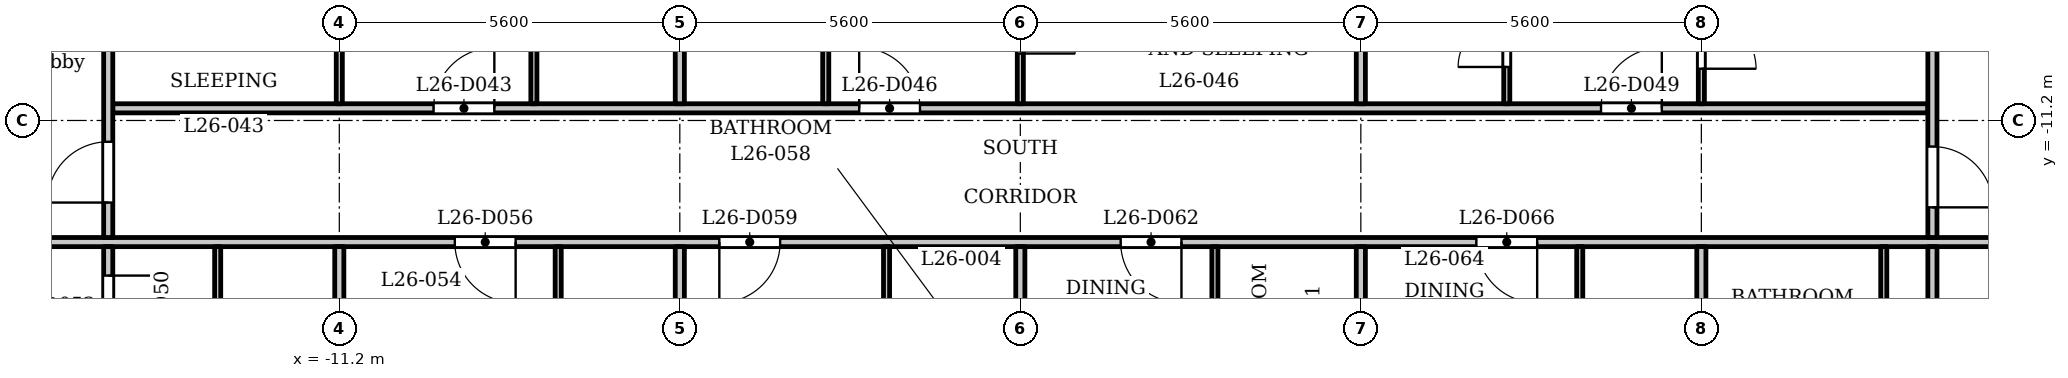
"""IFC4 building model, lengths in metres.
Left out: names, types, materials, properties, quantities, classifications, styles, units other than length and angle.
Written with IfcOpenShell. Run it as: python <this file> out.ifc"""

import sys

from ifc_helpers import new_model, si_unit, direction, frame, frame_2d, origin, place, context, subcontext, project, spatial, rectangle, extrude, element, fill, save


model = new_model("IFC4")
c1 = context("Model", 3, precision=1e-05, world=origin(), true_north=direction((0.0, 1.0)))
c2 = subcontext(c1, "Body", "Model", "MODEL_VIEW")
j1 = project(units=[si_unit("LENGTHUNIT", "METRE"), si_unit("PLANEANGLEUNIT", "RADIAN")], contexts=[c1])
p1 = place(None, origin())
s1 = spatial("IfcSite", under=j1, at=p1, CompositionType="ELEMENT")
p2 = place(p1, origin())
s2 = spatial("IfcBuilding", under=s1, at=p2, CompositionType="ELEMENT")
p3 = place(p2, frame((0.0, 0.0, 104.3)))
s3 = spatial("IfcBuildingStorey", under=s2, at=p3, CompositionType="ELEMENT", Elevation=104.3)
p4 = place(p3, frame((-17.4, -13.2, 0.0), z_axis=(0.0, 0.0, 1.0), x_axis=(1.0, 0.0, 0.0)))
e1 = element("IfcWall", 1, at=p4, inside=s3, PredefinedType="PARTITIONING", context=c2, shape_type="SweptSolid", body=[
    extrude(rectangle(XDim=34.8, YDim=0.15, at=frame_2d((17.4, 0.0))), origin(), (0.0, 0.0, 1.0), 3.2),
])
p5 = place(p4, frame((0.15, 0.0, 0.0)))
e2 = element("IfcOpeningElement", 2, at=p5, cuts=e1, PredefinedType="OPENING", context=c2, shape_type="SweptSolid", body=[
    extrude(rectangle(XDim=1.0, YDim=2.1, at=frame_2d((0.5, 1.05))), frame((0.0, 0.085, 0.0), z_axis=(0.0, -1.0, 0.0), x_axis=(1.0, 0.0, 0.0)), (0.0, 0.0, 1.0), 0.17),
])
p6 = place(p4, frame((33.55, 0.0, 0.0)))
e3 = element("IfcOpeningElement", 3, at=p6, cuts=e1, PredefinedType="OPENING", context=c2, shape_type="SweptSolid", body=[
    extrude(rectangle(XDim=1.0, YDim=2.1, at=frame_2d((0.5, 1.05))), frame((0.0, 0.085, 0.0), z_axis=(0.0, -1.0, 0.0), x_axis=(1.0, 0.0, 0.0)), (0.0, 0.0, 1.0), 0.17),
])
p7 = place(p4, frame((8.1, 0.0, 0.0)))
e4 = element("IfcOpeningElement", 4, at=p7, cuts=e1, PredefinedType="OPENING", context=c2, shape_type="SweptSolid", body=[
    extrude(rectangle(XDim=1.0, YDim=2.1, at=frame_2d((0.5, 1.05))), frame((0.0, 0.085, 0.0), z_axis=(0.0, -1.0, 0.0), x_axis=(1.0, 0.0, 0.0)), (0.0, 0.0, 1.0), 0.17),
])
p8 = place(p4, frame((12.45, 0.0, 0.0)))
e5 = element("IfcOpeningElement", 5, at=p8, cuts=e1, PredefinedType="OPENING", context=c2, shape_type="SweptSolid", body=[
    extrude(rectangle(XDim=1.0, YDim=2.1, at=frame_2d((0.5, 1.05))), frame((0.0, 0.085, 0.0), z_axis=(0.0, -1.0, 0.0), x_axis=(1.0, 0.0, 0.0)), (0.0, 0.0, 1.0), 0.17),
])
p9 = place(p4, frame((19.05, 0.0, 0.0)))
e6 = element("IfcOpeningElement", 6, at=p9, cuts=e1, PredefinedType="OPENING", context=c2, shape_type="SweptSolid", body=[
    extrude(rectangle(XDim=1.0, YDim=2.1, at=frame_2d((0.5, 1.05))), frame((0.0, 0.085, 0.0), z_axis=(0.0, -1.0, 0.0), x_axis=(1.0, 0.0, 0.0)), (0.0, 0.0, 1.0), 0.17),
])
p10 = place(p4, frame((24.9, 0.0, 0.0)))
e7 = element("IfcOpeningElement", 7, at=p10, cuts=e1, PredefinedType="OPENING", context=c2, shape_type="SweptSolid", body=[
    extrude(rectangle(XDim=1.0, YDim=2.1, at=frame_2d((0.5, 1.05))), frame((0.0, 0.085, 0.0), z_axis=(0.0, -1.0, 0.0), x_axis=(1.0, 0.0, 0.0)), (0.0, 0.0, 1.0), 0.17),
])
p11 = place(p3, frame((-14.925, -11.0, 0.0), z_axis=(0.0, 0.0, 1.0), x_axis=(1.0, 0.0, 0.0)))
e8 = element("IfcWall", 8, at=p11, inside=s3, PredefinedType="PARTITIONING", context=c2, shape_type="SweptSolid", body=[
    extrude(rectangle(XDim=29.85, YDim=0.15, at=frame_2d((14.925, 0.0))), origin(), (0.0, 0.0, 1.0), 3.2),
])
p12 = place(p11, frame((5.275, 0.0, 0.0)))
e9 = element("IfcOpeningElement", 9, at=p12, cuts=e8, PredefinedType="OPENING", context=c2, shape_type="SweptSolid", body=[
    extrude(rectangle(XDim=1.0, YDim=2.1, at=frame_2d((0.5, 1.05))), frame((0.0, 0.085, 0.0), z_axis=(0.0, -1.0, 0.0), x_axis=(1.0, 0.0, 0.0)), (0.0, 0.0, 1.0), 0.17),
])
p13 = place(p11, frame((12.275, 0.0, 0.0)))
e10 = element("IfcOpeningElement", 10, at=p13, cuts=e8, PredefinedType="OPENING", context=c2, shape_type="SweptSolid", body=[
    extrude(rectangle(XDim=1.0, YDim=2.1, at=frame_2d((0.5, 1.05))), frame((0.0, 0.085, 0.0), z_axis=(0.0, -1.0, 0.0), x_axis=(1.0, 0.0, 0.0)), (0.0, 0.0, 1.0), 0.17),
])
p14 = place(p11, frame((24.475, 0.0, 0.0)))
e11 = element("IfcOpeningElement", 11, at=p14, cuts=e8, PredefinedType="OPENING", context=c2, shape_type="SweptSolid", body=[
    extrude(rectangle(XDim=1.0, YDim=2.1, at=frame_2d((0.5, 1.05))), frame((0.0, 0.085, 0.0), z_axis=(0.0, -1.0, 0.0), x_axis=(1.0, 0.0, 0.0)), (0.0, 0.0, 1.0), 0.17),
])
p15 = place(p3, frame((-15.0, -15.325, 0.0), z_axis=(0.0, 0.0, 1.0), x_axis=(0.0, 1.0, 0.0)))
e12 = element("IfcWall", 12, at=p15, inside=s3, PredefinedType="PARTITIONING", context=c2, shape_type="SweptSolid", body=[
    extrude(rectangle(XDim=2.05, YDim=0.15, at=frame_2d((1.025, 0.0))), origin(), (0.0, 0.0, 1.0), 3.2),
])
p16 = place(p15, frame((0.574, 0.0, 0.0)))
e13 = element("IfcOpeningElement", 13, at=p16, cuts=e12, PredefinedType="OPENING", context=c2, shape_type="SweptSolid", body=[
    extrude(rectangle(XDim=1.0, YDim=2.1, at=frame_2d((0.5, 1.05))), frame((0.0, 0.085, 0.0), z_axis=(0.0, -1.0, 0.0), x_axis=(1.0, 0.0, 0.0)), (0.0, 0.0, 1.0), 0.17),
])
p17 = place(p3, frame((-15.0, -13.125, 0.0), z_axis=(0.0, 0.0, 1.0), x_axis=(0.0, 1.0, 0.0)))
e14 = element("IfcWall", 14, at=p17, inside=s3, PredefinedType="PARTITIONING", context=c2, shape_type="SweptSolid", body=[
    extrude(rectangle(XDim=6.356, YDim=0.15, at=frame_2d((3.178, 0.0))), origin(), (0.0, 0.0, 1.0), 3.2),
])
p18 = place(p17, frame((0.575, 0.0, 0.0)))
e15 = element("IfcOpeningElement", 15, at=p18, cuts=e14, PredefinedType="OPENING", context=c2, shape_type="SweptSolid", body=[
    extrude(rectangle(XDim=1.0, YDim=2.1, at=frame_2d((0.5, 1.05))), frame((0.0, 0.085, 0.0), z_axis=(0.0, -1.0, 0.0), x_axis=(1.0, 0.0, 0.0)), (0.0, 0.0, 1.0), 0.17),
])
p19 = place(p3, frame((-13.2, -16.45, 0.0), z_axis=(0.0, 0.0, 1.0), x_axis=(0.0, 1.0, 0.0)))
e16 = element("IfcWall", 16, at=p19, inside=s3, PredefinedType="PARTITIONING", context=c2, shape_type="SweptSolid", body=[
    extrude(rectangle(XDim=3.175, YDim=0.1, at=frame_2d((1.587, 0.0))), origin(), (0.0, 0.0, 1.0), 3.2),
])
p20 = place(p3, frame((-11.2, -10.925, 0.0), z_axis=(0.0, 0.0, 1.0), x_axis=(0.0, 1.0, 0.0)))
e17 = element("IfcWall", 17, at=p20, inside=s3, PredefinedType="PARTITIONING", context=c2, shape_type="SweptSolid", body=[
    extrude(rectangle(XDim=3.605, YDim=0.1, at=frame_2d((1.802, 0.0))), origin(), (0.0, 0.0, 1.0), 3.2),
])
p21 = place(p20, frame((1.005, 0.0, 0.0)))
e18 = element("IfcOpeningElement", 18, at=p21, cuts=e17, PredefinedType="OPENING", context=c2, shape_type="SweptSolid", body=[
    extrude(rectangle(XDim=0.9, YDim=2.1, at=frame_2d((0.45, 1.05))), frame((0.0, 0.06, 0.0), z_axis=(0.0, -1.0, 0.0), x_axis=(1.0, 0.0, 0.0)), (0.0, 0.0, 1.0), 0.12),
])
p22 = place(p3, frame((-11.2, -16.45, 0.0), z_axis=(0.0, 0.0, 1.0), x_axis=(0.0, 1.0, 0.0)))
e19 = element("IfcWall", 19, at=p22, inside=s3, PredefinedType="PARTITIONING", context=c2, shape_type="SweptSolid", body=[
    extrude(rectangle(XDim=3.175, YDim=0.15, at=frame_2d((1.587, 0.0))), origin(), (0.0, 0.0, 1.0), 3.2),
])
p23 = place(p3, frame((-8.0, -10.925, 0.0), z_axis=(0.0, 0.0, 1.0), x_axis=(0.0, 1.0, 0.0)))
e20 = element("IfcWall", 20, at=p23, inside=s3, PredefinedType="PARTITIONING", context=c2, shape_type="SweptSolid", body=[
    extrude(rectangle(XDim=3.605, YDim=0.1, at=frame_2d((1.802, 0.0))), origin(), (0.0, 0.0, 1.0), 3.2),
])
p24 = place(p23, frame((2.326, 0.0, 0.0)))
e21 = element("IfcOpeningElement", 21, at=p24, cuts=e20, PredefinedType="OPENING", context=c2, shape_type="SweptSolid", body=[
    extrude(rectangle(XDim=0.8, YDim=2.1, at=frame_2d((0.4, 1.05))), frame((0.0, 0.06, 0.0), z_axis=(0.0, -1.0, 0.0), x_axis=(1.0, 0.0, 0.0)), (0.0, 0.0, 1.0), 0.12),
])
p25 = place(p3, frame((-7.6, -16.45, 0.0), z_axis=(0.0, 0.0, 1.0), x_axis=(0.0, 1.0, 0.0)))
e22 = element("IfcWall", 22, at=p25, inside=s3, PredefinedType="PARTITIONING", context=c2, shape_type="SweptSolid", body=[
    extrude(rectangle(XDim=3.175, YDim=0.1, at=frame_2d((1.587, 0.0))), origin(), (0.0, 0.0, 1.0), 3.2),
])
p26 = place(p3, frame((-5.6, -16.45, 0.0), z_axis=(0.0, 0.0, 1.0), x_axis=(0.0, 1.0, 0.0)))
e23 = element("IfcWall", 23, at=p26, inside=s3, PredefinedType="PARTITIONING", context=c2, shape_type="SweptSolid", body=[
    extrude(rectangle(XDim=3.175, YDim=0.15, at=frame_2d((1.587, 0.0))), origin(), (0.0, 0.0, 1.0), 3.2),
])
p27 = place(p3, frame((-5.6, -10.925, 0.0), z_axis=(0.0, 0.0, 1.0), x_axis=(0.0, 1.0, 0.0)))
e24 = element("IfcWall", 24, at=p27, inside=s3, PredefinedType="PARTITIONING", context=c2, shape_type="SweptSolid", body=[
    extrude(rectangle(XDim=3.605, YDim=0.15, at=frame_2d((1.802, 0.0))), origin(), (0.0, 0.0, 1.0), 3.2),
])
p28 = place(p3, frame((-3.2, -10.925, 0.0), z_axis=(0.0, 0.0, 1.0), x_axis=(0.0, 1.0, 0.0)))
e25 = element("IfcWall", 25, at=p28, inside=s3, PredefinedType="PARTITIONING", context=c2, shape_type="SweptSolid", body=[
    extrude(rectangle(XDim=3.605, YDim=0.1, at=frame_2d((1.802, 0.0))), origin(), (0.0, 0.0, 1.0), 3.2),
])
p29 = place(p28, frame((2.355, 0.0, 0.0)))
e26 = element("IfcOpeningElement", 26, at=p29, cuts=e25, PredefinedType="OPENING", context=c2, shape_type="SweptSolid", body=[
    extrude(rectangle(XDim=0.8, YDim=2.1, at=frame_2d((0.4, 1.05))), frame((0.0, 0.06, 0.0), z_axis=(0.0, -1.0, 0.0), x_axis=(1.0, 0.0, 0.0)), (0.0, 0.0, 1.0), 0.12),
])
p30 = place(p3, frame((-2.2, -16.45, 0.0), z_axis=(0.0, 0.0, 1.0), x_axis=(0.0, 1.0, 0.0)))
e27 = element("IfcWall", 27, at=p30, inside=s3, PredefinedType="PARTITIONING", context=c2, shape_type="SweptSolid", body=[
    extrude(rectangle(XDim=3.175, YDim=0.1, at=frame_2d((1.587, 0.0))), origin(), (0.0, 0.0, 1.0), 3.2),
])
p31 = place(p3, frame((0.0, -10.925, 0.0), z_axis=(0.0, 0.0, 1.0), x_axis=(0.0, 1.0, 0.0)))
e28 = element("IfcWall", 28, at=p31, inside=s3, PredefinedType="PARTITIONING", context=c2, shape_type="SweptSolid", body=[
    extrude(rectangle(XDim=3.605, YDim=0.1, at=frame_2d((1.802, 0.0))), origin(), (0.0, 0.0, 1.0), 3.2),
])
p32 = place(p31, frame((0.826, 0.0, 0.0)))
e29 = element("IfcOpeningElement", 29, at=p32, cuts=e28, PredefinedType="OPENING", context=c2, shape_type="SweptSolid", body=[
    extrude(rectangle(XDim=0.9, YDim=2.1, at=frame_2d((0.45, 1.05))), frame((0.0, 0.06, 0.0), z_axis=(0.0, -1.0, 0.0), x_axis=(1.0, 0.0, 0.0)), (0.0, 0.0, 1.0), 0.12),
])
p33 = place(p3, frame((0.0, -16.45, 0.0), z_axis=(0.0, 0.0, 1.0), x_axis=(0.0, 1.0, 0.0)))
e30 = element("IfcWall", 30, at=p33, inside=s3, PredefinedType="PARTITIONING", context=c2, shape_type="SweptSolid", body=[
    extrude(rectangle(XDim=3.175, YDim=0.15, at=frame_2d((1.587, 0.0))), origin(), (0.0, 0.0, 1.0), 3.2),
])
p34 = place(p3, frame((3.2, -16.45, 0.0), z_axis=(0.0, 0.0, 1.0), x_axis=(0.0, 1.0, 0.0)))
e31 = element("IfcWall", 31, at=p34, inside=s3, PredefinedType="PARTITIONING", context=c2, shape_type="SweptSolid", body=[
    extrude(rectangle(XDim=3.175, YDim=0.1, at=frame_2d((1.587, 0.0))), origin(), (0.0, 0.0, 1.0), 3.2),
])
p35 = place(p3, frame((5.6, -16.45, 0.0), z_axis=(0.0, 0.0, 1.0), x_axis=(0.0, 1.0, 0.0)))
e32 = element("IfcWall", 32, at=p35, inside=s3, PredefinedType="PARTITIONING", context=c2, shape_type="SweptSolid", body=[
    extrude(rectangle(XDim=3.175, YDim=0.15, at=frame_2d((1.587, 0.0))), origin(), (0.0, 0.0, 1.0), 3.2),
])
p36 = place(p3, frame((5.6, -10.925, 0.0), z_axis=(0.0, 0.0, 1.0), x_axis=(0.0, 1.0, 0.0)))
e33 = element("IfcWall", 33, at=p36, inside=s3, PredefinedType="PARTITIONING", context=c2, shape_type="SweptSolid", body=[
    extrude(rectangle(XDim=3.605, YDim=0.15, at=frame_2d((1.802, 0.0))), origin(), (0.0, 0.0, 1.0), 3.2),
])
p37 = place(p3, frame((8.0, -10.925, 0.0), z_axis=(0.0, 0.0, 1.0), x_axis=(0.0, 1.0, 0.0)))
e34 = element("IfcWall", 34, at=p37, inside=s3, PredefinedType="PARTITIONING", context=c2, shape_type="SweptSolid", body=[
    extrude(rectangle(XDim=3.605, YDim=0.1, at=frame_2d((1.802, 0.0))), origin(), (0.0, 0.0, 1.0), 3.2),
])
p38 = place(p37, frame((0.605, 0.0, 0.0)))
e35 = element("IfcOpeningElement", 35, at=p38, cuts=e34, PredefinedType="OPENING", context=c2, shape_type="SweptSolid", body=[
    extrude(rectangle(XDim=0.8, YDim=2.1, at=frame_2d((0.4, 1.05))), frame((0.0, 0.06, 0.0), z_axis=(0.0, -1.0, 0.0), x_axis=(1.0, 0.0, 0.0)), (0.0, 0.0, 1.0), 0.12),
])
p39 = place(p3, frame((9.2, -16.45, 0.0), z_axis=(0.0, 0.0, 1.0), x_axis=(0.0, 1.0, 0.0)))
e36 = element("IfcWall", 36, at=p39, inside=s3, PredefinedType="PARTITIONING", context=c2, shape_type="SweptSolid", body=[
    extrude(rectangle(XDim=3.175, YDim=0.1, at=frame_2d((1.587, 0.0))), origin(), (0.0, 0.0, 1.0), 3.2),
])
p40 = place(p3, frame((11.2, -10.925, 0.0), z_axis=(0.0, 0.0, 1.0), x_axis=(0.0, 1.0, 0.0)))
e37 = element("IfcWall", 37, at=p40, inside=s3, PredefinedType="PARTITIONING", context=c2, shape_type="SweptSolid", body=[
    extrude(rectangle(XDim=3.605, YDim=0.1, at=frame_2d((1.802, 0.0))), origin(), (0.0, 0.0, 1.0), 3.2),
])
p41 = place(p40, frame((0.576, 0.0, 0.0)))
e38 = element("IfcOpeningElement", 38, at=p41, cuts=e37, PredefinedType="OPENING", context=c2, shape_type="SweptSolid", body=[
    extrude(rectangle(XDim=0.9, YDim=2.1, at=frame_2d((0.45, 1.05))), frame((0.0, 0.06, 0.0), z_axis=(0.0, -1.0, 0.0), x_axis=(1.0, 0.0, 0.0)), (0.0, 0.0, 1.0), 0.12),
])
p42 = place(p3, frame((11.2, -16.45, 0.0), z_axis=(0.0, 0.0, 1.0), x_axis=(0.0, 1.0, 0.0)))
e39 = element("IfcWall", 39, at=p42, inside=s3, PredefinedType="PARTITIONING", context=c2, shape_type="SweptSolid", body=[
    extrude(rectangle(XDim=3.175, YDim=0.15, at=frame_2d((1.587, 0.0))), origin(), (0.0, 0.0, 1.0), 3.2),
])
p43 = place(p3, frame((14.2, -16.45, 0.0), z_axis=(0.0, 0.0, 1.0), x_axis=(0.0, 1.0, 0.0)))
e40 = element("IfcWall", 40, at=p43, inside=s3, PredefinedType="PARTITIONING", context=c2, shape_type="SweptSolid", body=[
    extrude(rectangle(XDim=3.175, YDim=0.1, at=frame_2d((1.587, 0.0))), origin(), (0.0, 0.0, 1.0), 3.2),
])
p44 = place(p3, frame((15.0, -15.325, 0.0), z_axis=(0.0, 0.0, 1.0), x_axis=(0.0, 1.0, 0.0)))
e41 = element("IfcWall", 41, at=p44, inside=s3, PredefinedType="PARTITIONING", context=c2, shape_type="SweptSolid", body=[
    extrude(rectangle(XDim=2.05, YDim=0.15, at=frame_2d((1.025, 0.0))), origin(), (0.0, 0.0, 1.0), 3.2),
])
p45 = place(p3, frame((15.0, -13.125, 0.0), z_axis=(0.0, 0.0, 1.0), x_axis=(0.0, 1.0, 0.0)))
e42 = element("IfcWall", 42, at=p45, inside=s3, PredefinedType="PARTITIONING", context=c2, shape_type="SweptSolid", body=[
    extrude(rectangle(XDim=6.356, YDim=0.15, at=frame_2d((3.178, 0.0))), origin(), (0.0, 0.0, 1.0), 3.2),
])
p46 = place(p45, frame((0.496, 0.0, 0.0)))
e43 = element("IfcOpeningElement", 43, at=p46, cuts=e42, PredefinedType="OPENING", context=c2, shape_type="SweptSolid", body=[
    extrude(rectangle(XDim=1.0, YDim=2.1, at=frame_2d((0.5, 1.05))), frame((0.0, 0.085, 0.0), z_axis=(0.0, -1.0, 0.0), x_axis=(1.0, 0.0, 0.0)), (0.0, 0.0, 1.0), 0.17),
])
p47 = place(p18, origin())
e44 = element("IfcDoor", 44, at=p47, inside=s3, OperationType="SINGLE_SWING_RIGHT", PredefinedType="DOOR", context=c2, shape_type="SweptSolid", body=[
    extrude(rectangle(XDim=1.0, YDim=2.1, at=frame_2d((0.5, 1.05))), frame((0.0, 0.025, 0.0), z_axis=(0.0, -1.0, 0.0), x_axis=(1.0, 0.0, 0.0)), (0.0, 0.0, 1.0), 0.05),
])
fill(e15, e44)
p48 = place(p46, origin())
e45 = element("IfcDoor", 45, at=p48, inside=s3, OperationType="SINGLE_SWING_LEFT", PredefinedType="DOOR", context=c2, shape_type="SweptSolid", body=[
    extrude(rectangle(XDim=1.0, YDim=2.1, at=frame_2d((0.5, 1.05))), frame((0.0, 0.025, 0.0), z_axis=(0.0, -1.0, 0.0), x_axis=(1.0, 0.0, 0.0)), (0.0, 0.0, 1.0), 0.05),
])
fill(e43, e45)
p49 = place(p12, origin())
e46 = element("IfcDoor", 46, at=p49, inside=s3, OperationType="SINGLE_SWING_LEFT", PredefinedType="DOOR", context=c2, shape_type="SweptSolid", body=[
    extrude(rectangle(XDim=1.0, YDim=2.1, at=frame_2d((0.5, 1.05))), frame((0.0, 0.025, 0.0), z_axis=(0.0, -1.0, 0.0), x_axis=(1.0, 0.0, 0.0)), (0.0, 0.0, 1.0), 0.05),
])
fill(e9, e46)
p50 = place(p13, origin())
e47 = element("IfcDoor", 47, at=p50, inside=s3, OperationType="SINGLE_SWING_RIGHT", PredefinedType="DOOR", context=c2, shape_type="SweptSolid", body=[
    extrude(rectangle(XDim=1.0, YDim=2.1, at=frame_2d((0.5, 1.05))), frame((0.0, 0.025, 0.0), z_axis=(0.0, -1.0, 0.0), x_axis=(1.0, 0.0, 0.0)), (0.0, 0.0, 1.0), 0.05),
])
fill(e10, e47)
p51 = place(p32, origin())
e48 = element("IfcDoor", 48, at=p51, inside=s3, OperationType="SINGLE_SWING_LEFT", PredefinedType="DOOR", context=c2, shape_type="SweptSolid", body=[
    extrude(rectangle(XDim=0.9, YDim=2.1, at=frame_2d((0.45, 1.05))), frame((0.0, 0.025, 0.0), z_axis=(0.0, -1.0, 0.0), x_axis=(1.0, 0.0, 0.0)), (0.0, 0.0, 1.0), 0.05),
])
fill(e29, e48)
p52 = place(p14, origin())
e49 = element("IfcDoor", 49, at=p52, inside=s3, OperationType="SINGLE_SWING_LEFT", PredefinedType="DOOR", context=c2, shape_type="SweptSolid", body=[
    extrude(rectangle(XDim=1.0, YDim=2.1, at=frame_2d((0.5, 1.05))), frame((0.0, 0.025, 0.0), z_axis=(0.0, -1.0, 0.0), x_axis=(1.0, 0.0, 0.0)), (0.0, 0.0, 1.0), 0.05),
])
fill(e11, e49)
p53 = place(p38, origin())
e50 = element("IfcDoor", 50, at=p53, inside=s3, OperationType="SINGLE_SWING_RIGHT", PredefinedType="DOOR", context=c2, shape_type="SweptSolid", body=[
    extrude(rectangle(XDim=0.8, YDim=2.1, at=frame_2d((0.4, 1.05))), frame((0.0, 0.025, 0.0), z_axis=(0.0, -1.0, 0.0), x_axis=(1.0, 0.0, 0.0)), (0.0, 0.0, 1.0), 0.05),
])
fill(e35, e50)
p54 = place(p41, origin())
e51 = element("IfcDoor", 51, at=p54, inside=s3, OperationType="SINGLE_SWING_LEFT", PredefinedType="DOOR", context=c2, shape_type="SweptSolid", body=[
    extrude(rectangle(XDim=0.9, YDim=2.1, at=frame_2d((0.45, 1.05))), frame((0.0, 0.025, 0.0), z_axis=(0.0, -1.0, 0.0), x_axis=(1.0, 0.0, 0.0)), (0.0, 0.0, 1.0), 0.05),
])
fill(e38, e51)
p55 = place(p16, origin())
e52 = element("IfcDoor", 52, at=p55, inside=s3, OperationType="SINGLE_SWING_RIGHT", PredefinedType="DOOR", context=c2, shape_type="SweptSolid", body=[
    extrude(rectangle(XDim=1.0, YDim=2.1, at=frame_2d((0.5, 1.05))), frame((0.0, 0.025, 0.0), z_axis=(0.0, -1.0, 0.0), x_axis=(1.0, 0.0, 0.0)), (0.0, 0.0, 1.0), 0.05),
])
fill(e13, e52)
p56 = place(p7, origin())
e53 = element("IfcDoor", 53, at=p56, inside=s3, OperationType="SINGLE_SWING_RIGHT", PredefinedType="DOOR", context=c2, shape_type="SweptSolid", body=[
    extrude(rectangle(XDim=1.0, YDim=2.1, at=frame_2d((0.5, 1.05))), frame((0.0, 0.025, 0.0), z_axis=(0.0, -1.0, 0.0), x_axis=(1.0, 0.0, 0.0)), (0.0, 0.0, 1.0), 0.05),
])
fill(e4, e53)
p57 = place(p8, origin())
e54 = element("IfcDoor", 54, at=p57, inside=s3, OperationType="SINGLE_SWING_LEFT", PredefinedType="DOOR", context=c2, shape_type="SweptSolid", body=[
    extrude(rectangle(XDim=1.0, YDim=2.1, at=frame_2d((0.5, 1.05))), frame((0.0, 0.025, 0.0), z_axis=(0.0, -1.0, 0.0), x_axis=(1.0, 0.0, 0.0)), (0.0, 0.0, 1.0), 0.05),
])
fill(e5, e54)
p58 = place(p9, origin())
e55 = element("IfcDoor", 55, at=p58, inside=s3, OperationType="SINGLE_SWING_RIGHT", PredefinedType="DOOR", context=c2, shape_type="SweptSolid", body=[
    extrude(rectangle(XDim=1.0, YDim=2.1, at=frame_2d((0.5, 1.05))), frame((0.0, 0.025, 0.0), z_axis=(0.0, -1.0, 0.0), x_axis=(1.0, 0.0, 0.0)), (0.0, 0.0, 1.0), 0.05),
])
fill(e6, e55)
p59 = place(p10, origin())
e56 = element("IfcDoor", 56, at=p59, inside=s3, OperationType="SINGLE_SWING_RIGHT", PredefinedType="DOOR", context=c2, shape_type="SweptSolid", body=[
    extrude(rectangle(XDim=1.0, YDim=2.1, at=frame_2d((0.5, 1.05))), frame((0.0, 0.025, 0.0), z_axis=(0.0, -1.0, 0.0), x_axis=(1.0, 0.0, 0.0)), (0.0, 0.0, 1.0), 0.05),
])
fill(e7, e56)
save(model, sys.argv[1])
